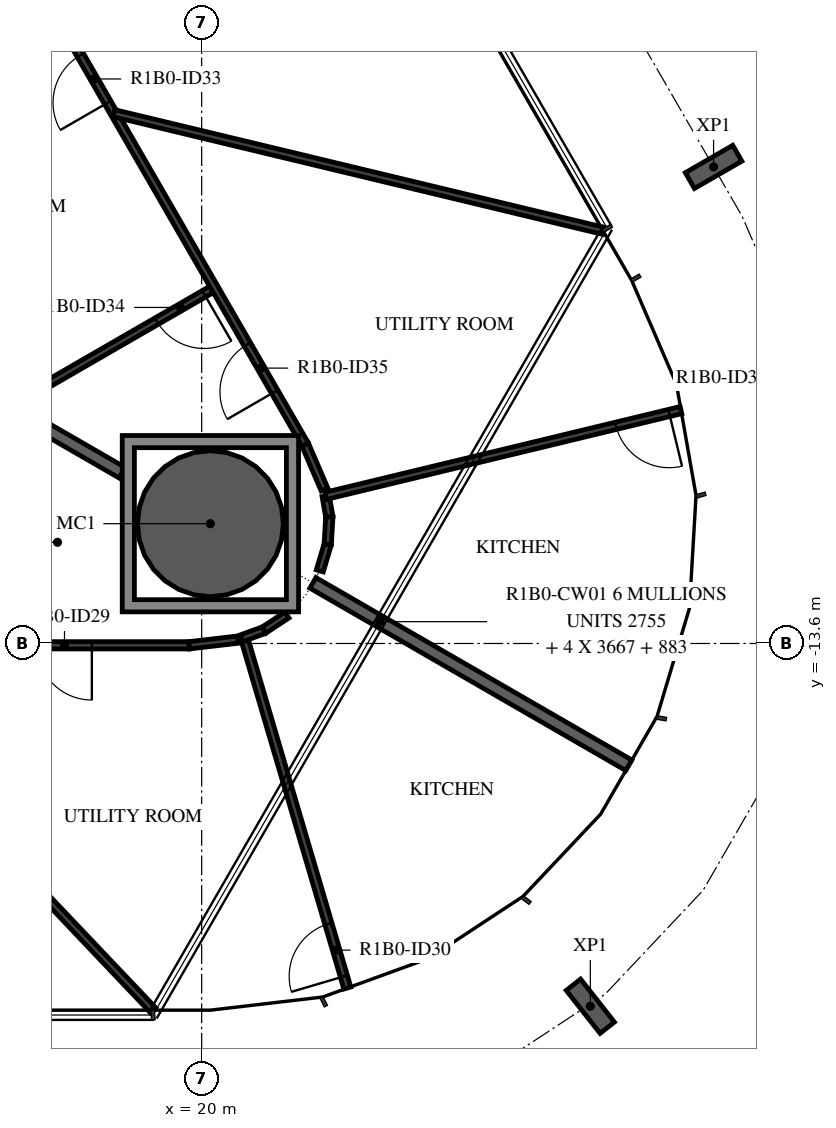
"""IFC4 building model, lengths in metres.
Left out: names, types, materials, properties, quantities, classifications, styles, units other than length and angle.
Written with IfcOpenShell. Run it as: python <this file> out.ifc"""

import sys

from ifc_helpers import new_model, si_unit, direction, frame, frame_2d, origin, origin_2d, place, context, subcontext, project, spatial, polyline, rectangle, hollow_circle, i_section, outline, extrude, element, fill, save


model = new_model("IFC4")
c1 = context("Model", 3, precision=1e-05, world=origin(), true_north=direction((0.0, 1.0)))
c2 = subcontext(c1, "Body", "Model", "MODEL_VIEW")
j1 = project(units=[si_unit("LENGTHUNIT", "METRE"), si_unit("PLANEANGLEUNIT", "RADIAN")], contexts=[c1])
p1 = place(None, origin())
s1 = spatial("IfcSite", under=j1, at=p1, CompositionType="ELEMENT")
p2 = place(p1, origin())
s2 = spatial("IfcBuilding", under=s1, at=p2, CompositionType="ELEMENT")
p3 = place(p2, frame((0.0, 0.0, 52.4)))
s3 = spatial("IfcBuildingStorey", under=s2, at=p3, CompositionType="ELEMENT", Elevation=52.4)
p4 = place(p3, frame((20.144, -11.63, -0.38), z_axis=(0.0, 0.0, 1.0), x_axis=(1.0, 0.0, 0.0)))
e1 = element("IfcColumn", 1, at=p4, inside=s3, PredefinedType="COLUMN", context=c2, shape_type="SweptSolid", body=[
    extrude(hollow_circle(Radius=1.2, WallThickness=0.06, at=origin_2d()), origin(), (0.0, 0.0, 1.0), 3.5),
])
for number, where, z_axis, x_axis in (
    (2, (26.392, -19.565, -0.38), (0.0, 0.0, 1.0), (-0.786, -0.619, 0.0)),
    (3, (28.419, -5.763, -0.38), (0.0, 0.0, 1.0), (0.5, -0.866, 0.0)),
):
    element("IfcColumn", number, at=place(p3, frame(where, z_axis=z_axis, x_axis=x_axis)), inside=s3, PredefinedType="COLUMN", context=c2, shape_type="SweptSolid", body=[
        extrude(i_section(OverallWidth=0.3, OverallDepth=0.9, WebThickness=0.019, FlangeThickness=0.035, FilletRadius=0.03, at=origin_2d()), origin(), (0.0, 0.0, 1.0), 3.5),
    ])
p5 = place(p3, frame((27.025, -15.603, 0.0), z_axis=(0.0, 0.0, 1.0), x_axis=(-0.866020924479, 0.500007758305, 0.0)))
e4 = element("IfcWall", 4, at=p5, inside=s3, PredefinedType="STANDARD", context=c2, shape_type="SweptSolid", body=[
    extrude(rectangle(XDim=6.0, YDim=0.2, at=frame_2d((3.0, 0.0))), origin(), (0.0, 0.0, 1.0), 3.12),
])
p6 = place(p3, frame((18.694, -10.793, 0.0), z_axis=(0.0, 0.0, 1.0), x_axis=(-0.866009251978, 0.500027974705, 0.0)))
e5 = element("IfcWall", 5, at=p6, inside=s3, PredefinedType="STANDARD", context=c2, shape_type="SweptSolid", body=[
    extrude(rectangle(XDim=2.167, YDim=0.2, at=frame_2d((1.084, 0.0))), origin(), (0.0, 0.0, 1.0), 3.12),
])
p7 = place(p3, frame((19.2, -19.63, 0.0), z_axis=(0.0, 0.0, 1.0), x_axis=(-0.688544699396, 0.72519390299, 0.0)))
e6 = element("IfcWall", 6, at=p7, inside=s3, PredefinedType="PARTITIONING", context=c2, shape_type="SweptSolid", body=[
    extrude(rectangle(XDim=8.274, YDim=0.12, at=frame_2d((4.137, 0.0))), origin(), (0.0, 0.0, 1.0), 3.12),
])
p8 = place(p3, frame((19.794, -13.63, 0.0), z_axis=(0.0, 0.0, 1.0), x_axis=(-1.0, 0.0, 0.0)))
e7 = element("IfcWall", 7, at=p8, inside=s3, PredefinedType="PARTITIONING", context=c2, shape_type="SweptSolid", body=[
    extrude(rectangle(XDim=8.116, YDim=0.12, at=frame_2d((4.058, 0.0))), origin(), (0.0, 0.0, 1.0), 3.12),
])
p9 = place(p8, frame((6.436, 0.0, 0.0)))
e8 = element("IfcOpeningElement", 8, at=p9, cuts=e7, PredefinedType="OPENING", context=c2, shape_type="SweptSolid", body=[
    extrude(rectangle(XDim=0.9, YDim=2.1, at=frame_2d((0.45, 1.05))), frame((0.0, 0.07, 0.0), z_axis=(0.0, -1.0, 0.0), x_axis=(1.0, 0.0, 0.0)), (0.0, 0.0, 1.0), 0.14),
])
p10 = place(p8, frame((1.6, 0.0, 0.0)))
e9 = element("IfcOpeningElement", 9, at=p10, cuts=e7, PredefinedType="OPENING", context=c2, shape_type="SweptSolid", body=[
    extrude(rectangle(XDim=0.9, YDim=2.1, at=frame_2d((0.45, 1.05))), frame((0.0, 0.07, 0.0), z_axis=(0.0, -1.0, 0.0), x_axis=(1.0, 0.0, 0.0)), (0.0, 0.0, 1.0), 0.14),
])
p11 = place(p3, frame((22.396, -19.266, 0.0), z_axis=(0.0, 0.0, 1.0), x_axis=(-0.282896205585, 0.959150528783, 0.0)))
e10 = element("IfcWall", 10, at=p11, inside=s3, PredefinedType="PARTITIONING", context=c2, shape_type="SweptSolid", body=[
    extrude(rectangle(XDim=6.012, YDim=0.12, at=frame_2d((3.006, 0.0))), origin(), (0.0, 0.0, 1.0), 3.12),
])
p12 = place(p11, frame((0.2, 0.0, 0.0)))
e11 = element("IfcOpeningElement", 11, at=p12, cuts=e10, PredefinedType="OPENING", context=c2, shape_type="SweptSolid", body=[
    extrude(rectangle(XDim=0.9, YDim=2.1, at=frame_2d((0.45, 1.05))), frame((0.0, 0.07, 0.0), z_axis=(0.0, -1.0, 0.0), x_axis=(1.0, 0.0, 0.0)), (0.0, 0.0, 1.0), 0.14),
])
p13 = place(p3, frame((20.595, -13.536, 0.0), z_axis=(0.0, 0.0, 1.0), x_axis=(-0.993259655268, -0.115910556968, 0.0)))
e12 = element("IfcWall", 12, at=p13, inside=s3, PredefinedType="PARTITIONING", context=c2, shape_type="SweptSolid", body=[
    extrude(rectangle(XDim=0.807, YDim=0.12, at=frame_2d((0.403, 0.0))), origin(), (0.0, 0.0, 1.0), 3.12),
])
p14 = place(p3, frame((21.403, -13.131, 0.0), z_axis=(0.0, 0.0, 1.0), x_axis=(-0.835339231854, -0.549734815821, 0.0)))
e13 = element("IfcWall", 13, at=p14, inside=s3, PredefinedType="PARTITIONING", context=c2, shape_type="SweptSolid", body=[
    extrude(rectangle(XDim=0.455, YDim=0.12, at=frame_2d((0.228, 0.0))), origin(), (0.0, 0.0, 1.0), 3.12),
])
p15 = place(p3, frame((21.023, -13.381, 0.0), z_axis=(0.0, 0.0, 1.0), x_axis=(-0.939665068469, -0.34209583321, 0.0)))
e14 = element("IfcWall", 14, at=p15, inside=s3, PredefinedType="PARTITIONING", context=c2, shape_type="SweptSolid", body=[
    extrude(rectangle(XDim=0.389, YDim=0.12, at=frame_2d((0.194, 0.0))), origin(), (0.0, 0.0, 1.0), 3.12),
])
p16 = place(p3, frame((21.942, -12.406, 0.0), z_axis=(0.0, 0.0, 1.0), x_axis=(0.287101711529, 0.957900102953, 0.0)))
e15 = element("IfcWall", 15, at=p16, inside=s3, PredefinedType="PARTITIONING", context=c2, shape_type="SweptSolid", body=[
    extrude(rectangle(XDim=0.455, YDim=0.12, at=frame_2d((0.228, 0.0))), origin(), (0.0, 0.0, 1.0), 3.12),
])
p17 = place(p3, frame((22.073, -11.97, 0.0), z_axis=(0.0, 0.0, 1.0), x_axis=(0.058533144572, 0.998285465679, 0.0)))
e16 = element("IfcWall", 16, at=p17, inside=s3, PredefinedType="PARTITIONING", context=c2, shape_type="SweptSolid", body=[
    extrude(rectangle(XDim=0.455, YDim=0.12, at=frame_2d((0.227, 0.0))), origin(), (0.0, 0.0, 1.0), 3.12),
])
p18 = place(p3, frame((22.1, -11.516, 0.0), z_axis=(0.0, 0.0, 1.0), x_axis=(-0.174264410128, 0.984698895786, 0.0)))
e17 = element("IfcWall", 17, at=p18, inside=s3, PredefinedType="PARTITIONING", context=c2, shape_type="SweptSolid", body=[
    extrude(rectangle(XDim=0.349, YDim=0.12, at=frame_2d((0.174, 0.0))), origin(), (0.0, 0.0, 1.0), 3.12),
])
p19 = place(p3, frame((20.212, -7.749, 0.0), z_axis=(0.0, 0.0, 1.0), x_axis=(-0.86604663799, -0.499963219473, 0.0)))
e18 = element("IfcWall", 18, at=p19, inside=s3, PredefinedType="PARTITIONING", context=c2, shape_type="SweptSolid", body=[
    extrude(rectangle(XDim=3.921, YDim=0.12, at=frame_2d((1.96, 0.0))), origin(), (0.0, 0.0, 1.0), 3.12),
])
p20 = place(p19, frame((0.2, 0.0, 0.0)))
e19 = element("IfcOpeningElement", 19, at=p20, cuts=e18, PredefinedType="OPENING", context=c2, shape_type="SweptSolid", body=[
    extrude(rectangle(XDim=0.9, YDim=2.1, at=frame_2d((0.45, 1.05))), frame((0.0, 0.07, 0.0), z_axis=(0.0, -1.0, 0.0), x_axis=(1.0, 0.0, 0.0)), (0.0, 0.0, 1.0), 0.14),
])
p21 = place(p3, frame((22.021, -11.068, 0.0), z_axis=(0.0, 0.0, 1.0), x_axis=(-0.396036092975, 0.918234944369, 0.0)))
e20 = element("IfcWall", 20, at=p21, inside=s3, PredefinedType="PARTITIONING", context=c2, shape_type="SweptSolid", body=[
    extrude(rectangle(XDim=0.807, YDim=0.12, at=frame_2d((0.403, 0.0))), origin(), (0.0, 0.0, 1.0), 3.12),
])
p22 = place(p3, frame((21.701, -10.327, 0.0), z_axis=(0.0, 0.0, 1.0), x_axis=(-0.500008528526, 0.866020479782, 0.0)))
e21 = element("IfcWall", 21, at=p22, inside=s3, PredefinedType="PARTITIONING", context=c2, shape_type="SweptSolid", body=[
    extrude(rectangle(XDim=13.002, YDim=0.12, at=frame_2d((6.501, 0.0))), origin(), (0.0, 0.0, 1.0), 3.12),
])
p23 = place(p22, frame((6.49, 0.0, 0.0)))
e22 = element("IfcOpeningElement", 22, at=p23, cuts=e21, PredefinedType="OPENING", context=c2, shape_type="SweptSolid", body=[
    extrude(rectangle(XDim=0.9, YDim=2.1, at=frame_2d((0.45, 1.05))), frame((0.0, 0.07, 0.0), z_axis=(0.0, -1.0, 0.0), x_axis=(1.0, 0.0, 0.0)), (0.0, 0.0, 1.0), 0.14),
])
p24 = place(p22, frame((1.0, 0.0, 0.0)))
e23 = element("IfcOpeningElement", 23, at=p24, cuts=e21, PredefinedType="OPENING", context=c2, shape_type="SweptSolid", body=[
    extrude(rectangle(XDim=0.9, YDim=2.1, at=frame_2d((0.45, 1.05))), frame((0.0, 0.07, 0.0), z_axis=(0.0, -1.0, 0.0), x_axis=(1.0, 0.0, 0.0)), (0.0, 0.0, 1.0), 0.14),
])
p25 = place(p3, frame((27.883, -9.762, 0.0), z_axis=(0.0, 0.0, 1.0), x_axis=(-0.972090512558, -0.234606128213, 0.0)))
e24 = element("IfcWall", 24, at=p25, inside=s3, PredefinedType="PARTITIONING", context=c2, shape_type="SweptSolid", body=[
    extrude(rectangle(XDim=6.012, YDim=0.12, at=frame_2d((3.006, 0.0))), origin(), (0.0, 0.0, 1.0), 3.12),
])
p26 = place(p25, frame((0.2, 0.0, 0.0)))
e25 = element("IfcOpeningElement", 25, at=p26, cuts=e24, PredefinedType="OPENING", context=c2, shape_type="SweptSolid", body=[
    extrude(rectangle(XDim=0.9, YDim=2.1, at=frame_2d((0.45, 1.05))), frame((0.0, 0.07, 0.0), z_axis=(0.0, -1.0, 0.0), x_axis=(1.0, 0.0, 0.0)), (0.0, 0.0, 1.0), 0.14),
])
p27 = place(p3, frame((17.706, -3.408, 0.0), z_axis=(0.0, 0.0, 1.0), x_axis=(-0.866027421574, -0.49999650507, 0.0)))
e26 = element("IfcWall", 26, at=p27, inside=s3, PredefinedType="PARTITIONING", context=c2, shape_type="SweptSolid", body=[
    extrude(rectangle(XDim=3.676, YDim=0.12, at=frame_2d((1.838, 0.0))), origin(), (0.0, 0.0, 1.0), 3.12),
])
p28 = place(p3, frame((26.6, -6.813, 0.0), z_axis=(0.0, 0.0, 1.0), x_axis=(-0.972306888212, 0.233707755831, 0.0)))
e27 = element("IfcWall", 27, at=p28, inside=s3, PredefinedType="PARTITIONING", context=c2, shape_type="SweptSolid", body=[
    extrude(rectangle(XDim=8.273, YDim=0.12, at=frame_2d((4.137, 0.0))), origin(), (0.0, 0.0, 1.0), 3.12),
])
p29 = place(p3, origin())
e28 = element("IfcWall", 28, at=p29, inside=s3, PredefinedType="STANDARD", context=c2, shape_type="SweptSolid", body=[
    extrude(outline(polyline([(21.594, -10.18), (21.594, -13.08), (18.694, -13.08), (18.694, -10.18), (21.594, -10.18)]), holes=[polyline([(18.894, -12.88), (21.394, -12.88), (21.394, -10.38), (18.894, -10.38), (18.894, -12.88)])]), origin(), (0.0, 0.0, 1.0), 3.12),
])
p30 = place(p10, origin())
e29 = element("IfcDoor", 29, at=p30, inside=s3, OperationType="SINGLE_SWING_RIGHT", PredefinedType="DOOR", context=c2, shape_type="SweptSolid", body=[
    extrude(rectangle(XDim=0.9, YDim=2.1, at=frame_2d((0.45, 1.05))), frame((0.0, 0.025, 0.0), z_axis=(0.0, -1.0, 0.0), x_axis=(1.0, 0.0, 0.0)), (0.0, 0.0, 1.0), 0.05),
])
fill(e9, e29)
p31 = place(p12, origin())
e30 = element("IfcDoor", 30, at=p31, inside=s3, OperationType="SINGLE_SWING_RIGHT", PredefinedType="DOOR", context=c2, shape_type="SweptSolid", body=[
    extrude(rectangle(XDim=0.9, YDim=2.1, at=frame_2d((0.45, 1.05))), frame((0.0, 0.025, 0.0), z_axis=(0.0, -1.0, 0.0), x_axis=(1.0, 0.0, 0.0)), (0.0, 0.0, 1.0), 0.05),
])
fill(e11, e30)
p32 = place(p23, origin())
e31 = element("IfcDoor", 31, at=p32, inside=s3, OperationType="SINGLE_SWING_LEFT", PredefinedType="DOOR", context=c2, shape_type="SweptSolid", body=[
    extrude(rectangle(XDim=0.9, YDim=2.1, at=frame_2d((0.45, 1.05))), frame((0.0, 0.025, 0.0), z_axis=(0.0, -1.0, 0.0), x_axis=(1.0, 0.0, 0.0)), (0.0, 0.0, 1.0), 0.05),
])
fill(e22, e31)
p33 = place(p20, origin())
e32 = element("IfcDoor", 32, at=p33, inside=s3, OperationType="SINGLE_SWING_LEFT", PredefinedType="DOOR", context=c2, shape_type="SweptSolid", body=[
    extrude(rectangle(XDim=0.9, YDim=2.1, at=frame_2d((0.45, 1.05))), frame((0.0, 0.025, 0.0), z_axis=(0.0, -1.0, 0.0), x_axis=(1.0, 0.0, 0.0)), (0.0, 0.0, 1.0), 0.05),
])
fill(e19, e32)
p34 = place(p24, origin())
e33 = element("IfcDoor", 33, at=p34, inside=s3, OperationType="SINGLE_SWING_LEFT", PredefinedType="DOOR", context=c2, shape_type="SweptSolid", body=[
    extrude(rectangle(XDim=0.9, YDim=2.1, at=frame_2d((0.45, 1.05))), frame((0.0, 0.025, 0.0), z_axis=(0.0, -1.0, 0.0), x_axis=(1.0, 0.0, 0.0)), (0.0, 0.0, 1.0), 0.05),
])
fill(e23, e33)
p35 = place(p26, origin())
e34 = element("IfcDoor", 34, at=p35, inside=s3, OperationType="SINGLE_SWING_LEFT", PredefinedType="DOOR", context=c2, shape_type="SweptSolid", body=[
    extrude(rectangle(XDim=0.9, YDim=2.1, at=frame_2d((0.45, 1.05))), frame((0.0, 0.025, 0.0), z_axis=(0.0, -1.0, 0.0), x_axis=(1.0, 0.0, 0.0)), (0.0, 0.0, 1.0), 0.05),
])
fill(e25, e34)
save(model, sys.argv[1])
